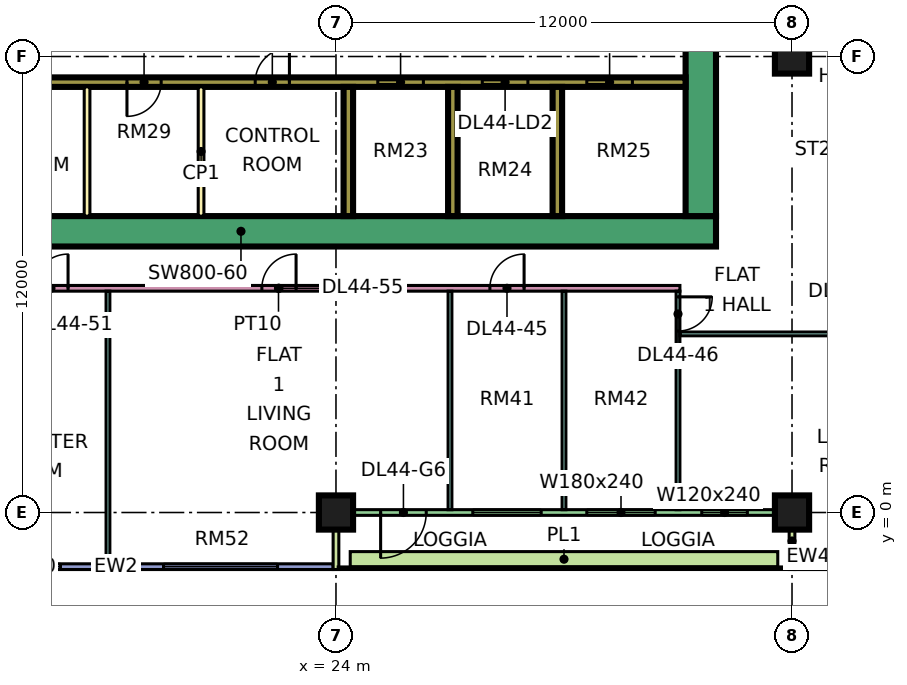
"""IFC4 building model, lengths in metres.
Left out: names, types, materials, properties, quantities, classifications, styles, units other than length and angle.
Written with IfcOpenShell. Run it as: python <this file> out.ifc"""

import sys

from ifc_helpers import new_model, si_unit, direction, frame, frame_2d, origin, origin_2d, place, context, subcontext, project, spatial, rectangle, extrude, element, fill, save


model = new_model("IFC4")
c1 = context("Model", 3, precision=1e-05, world=origin(), true_north=direction((0.0, 1.0)))
c2 = subcontext(c1, "Body", "Model", "MODEL_VIEW")
j1 = project(units=[si_unit("LENGTHUNIT", "METRE"), si_unit("PLANEANGLEUNIT", "RADIAN")], contexts=[c1])
p1 = place(None, origin())
s1 = spatial("IfcSite", under=j1, at=p1, CompositionType="ELEMENT")
p2 = place(p1, origin())
s2 = spatial("IfcBuilding", under=s1, at=p2, CompositionType="ELEMENT")
p3 = place(p2, frame((0.0, 0.0, 191.15)))
s3 = spatial("IfcBuildingStorey", under=s2, at=p3, CompositionType="ELEMENT", Elevation=191.15)
for number, where, z_axis, x_axis in (
    (1, (24.0, 0.0, 0.0), (0.0, 0.0, 1.0), (1.0, 0.0, 0.0)),
    (2, (36.0, 0.0, 0.0), (0.0, 0.0, 1.0), (1.0, 0.0, 0.0)),
    (3, (36.0, 12.0, 0.0), (0.0, 0.0, 1.0), (1.0, 0.0, 0.0)),
):
    element("IfcColumn", number, at=place(p3, frame(where, z_axis=z_axis, x_axis=x_axis)), inside=s3, PredefinedType="COLUMN", context=c2, shape_type="SweptSolid", body=[
        extrude(rectangle(XDim=0.9, YDim=0.9, at=origin_2d()), origin(), (0.0, 0.0, 1.0), 3.75),
    ])
p4 = place(p3, frame((9.0, 7.4, 0.0), z_axis=(0.0, 0.0, 1.0), x_axis=(1.0, 0.0, 0.0)))
e4 = element("IfcWall", 4, at=p4, inside=s3, PredefinedType="SHEAR", context=c2, shape_type="SweptSolid", body=[
    extrude(rectangle(XDim=25.0, YDim=0.8, at=frame_2d((12.5, 0.0))), origin(), (0.0, 0.0, 1.0), 3.75),
])
p5 = place(p3, frame((33.6, 7.8, 0.0), z_axis=(0.0, 0.0, 1.0), x_axis=(0.0, 1.0, 0.0)))
e5 = element("IfcWall", 5, at=p5, inside=s3, PredefinedType="SHEAR", context=c2, shape_type="SweptSolid", body=[
    extrude(rectangle(XDim=11.4, YDim=0.8, at=frame_2d((5.7, 0.0))), origin(), (0.0, 0.0, 1.0), 3.75),
])
p6 = place(p5, frame((5.4, 0.0, 0.0)))
e6 = element("IfcOpeningElement", 6, at=p6, cuts=e5, PredefinedType="OPENING", context=c2, shape_type="SweptSolid", body=[
    extrude(rectangle(XDim=1.8, YDim=2.4, at=frame_2d((0.9, 1.2))), frame((0.0, 0.41, 0.0), z_axis=(0.0, -1.0, 0.0), x_axis=(1.0, 0.0, 0.0)), (0.0, 0.0, 1.0), 0.82),
])
p7 = place(p3, frame((13.45, 11.325, 0.0), z_axis=(0.0, 0.0, 1.0), x_axis=(1.0, 0.0, 0.0)))
e7 = element("IfcWall", 7, at=p7, inside=s3, PredefinedType="SHEAR", context=c2, shape_type="SweptSolid", body=[
    extrude(rectangle(XDim=19.75, YDim=0.25, at=frame_2d((9.875, 0.0))), origin(), (0.0, 0.0, 1.0), 3.75),
])
p8 = place(p7, frame((11.65, 0.0, 0.0)))
e8 = element("IfcOpeningElement", 8, at=p8, cuts=e7, PredefinedType="OPENING", context=c2, shape_type="SweptSolid", body=[
    extrude(rectangle(XDim=1.2, YDim=2.2, at=frame_2d((0.6, 1.1))), frame((0.0, 0.135, 0.0), z_axis=(0.0, -1.0, 0.0), x_axis=(1.0, 0.0, 0.0)), (0.0, 0.0, 1.0), 0.27),
])
p9 = place(p7, frame((14.4, 0.0, 0.0)))
e9 = element("IfcOpeningElement", 9, at=p9, cuts=e7, PredefinedType="OPENING", context=c2, shape_type="SweptSolid", body=[
    extrude(rectangle(XDim=1.2, YDim=2.2, at=frame_2d((0.6, 1.1))), frame((0.0, 0.135, 0.0), z_axis=(0.0, -1.0, 0.0), x_axis=(1.0, 0.0, 0.0)), (0.0, 0.0, 1.0), 0.27),
])
p10 = place(p7, frame((17.15, 0.0, 0.0)))
e10 = element("IfcOpeningElement", 10, at=p10, cuts=e7, PredefinedType="OPENING", context=c2, shape_type="SweptSolid", body=[
    extrude(rectangle(XDim=1.2, YDim=2.2, at=frame_2d((0.6, 1.1))), frame((0.0, 0.135, 0.0), z_axis=(0.0, -1.0, 0.0), x_axis=(1.0, 0.0, 0.0)), (0.0, 0.0, 1.0), 0.27),
])
p11 = place(p7, frame((1.55, 0.0, 0.0)))
e11 = element("IfcOpeningElement", 11, at=p11, cuts=e7, PredefinedType="OPENING", context=c2, shape_type="SweptSolid", body=[
    extrude(rectangle(XDim=0.9, YDim=2.1, at=frame_2d((0.45, 1.05))), frame((0.0, 0.135, 0.0), z_axis=(0.0, -1.0, 0.0), x_axis=(1.0, 0.0, 0.0)), (0.0, 0.0, 1.0), 0.27),
])
p12 = place(p7, frame((5.05, 0.0, 0.0)))
e12 = element("IfcOpeningElement", 12, at=p12, cuts=e7, PredefinedType="OPENING", context=c2, shape_type="SweptSolid", body=[
    extrude(rectangle(XDim=0.9, YDim=2.1, at=frame_2d((0.45, 1.05))), frame((0.0, 0.135, 0.0), z_axis=(0.0, -1.0, 0.0), x_axis=(1.0, 0.0, 0.0)), (0.0, 0.0, 1.0), 0.27),
])
p13 = place(p7, frame((8.425, 0.0, 0.0)))
e13 = element("IfcOpeningElement", 13, at=p13, cuts=e7, PredefinedType="OPENING", context=c2, shape_type="SweptSolid", body=[
    extrude(rectangle(XDim=0.9, YDim=2.1, at=frame_2d((0.45, 1.05))), frame((0.0, 0.135, 0.0), z_axis=(0.0, -1.0, 0.0), x_axis=(1.0, 0.0, 0.0)), (0.0, 0.0, 1.0), 0.27),
])
for number, where, z_axis, x_axis in (
    (14, (24.325, 7.8, 0.0), (0.0, 0.0, 1.0), (0.0, 1.0, 0.0)),
    (15, (27.075, 7.8, 0.0), (0.0, 0.0, 1.0), (0.0, 1.0, 0.0)),
    (16, (29.825, 7.8, 0.0), (0.0, 0.0, 1.0), (0.0, 1.0, 0.0)),
):
    element("IfcWall", number, at=place(p3, frame(where, z_axis=z_axis, x_axis=x_axis)), inside=s3, PredefinedType="SHEAR", context=c2, shape_type="SweptSolid", body=[
        extrude(rectangle(XDim=3.4, YDim=0.25, at=frame_2d((1.7, 0.0))), origin(), (0.0, 0.0, 1.0), 3.75),
    ])
p14 = place(p3, frame((12.5, -1.425, 0.0), z_axis=(0.0, 0.0, 1.0), x_axis=(1.0, 0.0, 0.0)))
e17 = element("IfcWall", 17, at=p14, inside=s3, PredefinedType="SOLIDWALL", context=c2, shape_type="SweptSolid", body=[
    extrude(rectangle(XDim=11.425, YDim=0.15, at=frame_2d((5.712, 0.0))), origin(), (0.0, 0.0, 1.0), 3.35),
])
p15 = place(p14, frame((1.25, 0.0, 0.45)))
e18 = element("IfcOpeningElement", 18, at=p15, cuts=e17, PredefinedType="OPENING", context=c2, shape_type="SweptSolid", body=[
    extrude(rectangle(XDim=3.0, YDim=2.4, at=frame_2d((1.5, 1.2))), frame((0.0, 0.085, 0.0), z_axis=(0.0, -1.0, 0.0), x_axis=(1.0, 0.0, 0.0)), (0.0, 0.0, 1.0), 0.17),
])
p16 = place(p14, frame((6.962, 0.0, 0.45)))
e19 = element("IfcOpeningElement", 19, at=p16, cuts=e17, PredefinedType="OPENING", context=c2, shape_type="SweptSolid", body=[
    extrude(rectangle(XDim=3.0, YDim=2.4, at=frame_2d((1.5, 1.2))), frame((0.0, 0.085, 0.0), z_axis=(0.0, -1.0, 0.0), x_axis=(1.0, 0.0, 0.0)), (0.0, 0.0, 1.0), 0.17),
])
p17 = place(p3, frame((24.075, 0.0, 0.0), z_axis=(0.0, 0.0, 1.0), x_axis=(1.0, 0.0, 0.0)))
e20 = element("IfcWall", 20, at=p17, inside=s3, PredefinedType="SOLIDWALL", context=c2, shape_type="SweptSolid", body=[
    extrude(rectangle(XDim=11.85, YDim=0.15, at=frame_2d((5.925, 0.0))), origin(), (0.0, 0.0, 1.0), 3.35),
])
p18 = place(p17, frame((1.1, 0.0, 0.0)))
e21 = element("IfcOpeningElement", 21, at=p18, cuts=e20, PredefinedType="OPENING", context=c2, shape_type="SweptSolid", body=[
    extrude(rectangle(XDim=1.2, YDim=2.4, at=frame_2d((0.6, 1.2))), frame((0.0, 0.085, 0.0), z_axis=(0.0, -1.0, 0.0), x_axis=(1.0, 0.0, 0.0)), (0.0, 0.0, 1.0), 0.17),
])
p19 = place(p17, frame((3.525, 0.0, 0.45)))
e22 = element("IfcOpeningElement", 22, at=p19, cuts=e20, PredefinedType="OPENING", context=c2, shape_type="SweptSolid", body=[
    extrude(rectangle(XDim=1.8, YDim=2.4, at=frame_2d((0.9, 1.2))), frame((0.0, 0.085, 0.0), z_axis=(0.0, -1.0, 0.0), x_axis=(1.0, 0.0, 0.0)), (0.0, 0.0, 1.0), 0.17),
])
p20 = place(p17, frame((6.525, 0.0, 0.45)))
e23 = element("IfcOpeningElement", 23, at=p20, cuts=e20, PredefinedType="OPENING", context=c2, shape_type="SweptSolid", body=[
    extrude(rectangle(XDim=1.8, YDim=2.4, at=frame_2d((0.9, 1.2))), frame((0.0, 0.085, 0.0), z_axis=(0.0, -1.0, 0.0), x_axis=(1.0, 0.0, 0.0)), (0.0, 0.0, 1.0), 0.17),
])
p21 = place(p17, frame((9.55, 0.0, 0.45)))
e24 = element("IfcOpeningElement", 24, at=p21, cuts=e20, PredefinedType="OPENING", context=c2, shape_type="SweptSolid", body=[
    extrude(rectangle(XDim=1.2, YDim=2.4, at=frame_2d((0.6, 1.2))), frame((0.0, 0.085, 0.0), z_axis=(0.0, -1.0, 0.0), x_axis=(1.0, 0.0, 0.0)), (0.0, 0.0, 1.0), 0.17),
])
for number, where, z_axis, x_axis in (
    (25, (24.0, -1.5, 0.0), (0.0, 0.0, 1.0), (0.0, 1.0, 0.0)),
    (26, (36.0, -1.5, 0.0), (0.0, 0.0, 1.0), (0.0, 1.0, 0.0)),
):
    element("IfcWall", number, at=place(p3, frame(where, z_axis=z_axis, x_axis=x_axis)), inside=s3, PredefinedType="SOLIDWALL", context=c2, shape_type="SweptSolid", body=[
        extrude(rectangle(XDim=1.5, YDim=0.15, at=frame_2d((0.75, 0.0))), origin(), (0.0, 0.0, 1.0), 3.35),
    ])
p22 = place(p3, frame((36.075, -1.425, 0.0), z_axis=(0.0, 0.0, 1.0), x_axis=(1.0, 0.0, 0.0)))
e27 = element("IfcWall", 27, at=p22, inside=s3, PredefinedType="SOLIDWALL", context=c2, shape_type="SweptSolid", body=[
    extrude(rectangle(XDim=11.85, YDim=0.15, at=frame_2d((5.925, 0.0))), origin(), (0.0, 0.0, 1.0), 3.35),
])
p23 = place(p22, frame((1.462, 0.0, 0.45)))
e28 = element("IfcOpeningElement", 28, at=p23, cuts=e27, PredefinedType="OPENING", context=c2, shape_type="SweptSolid", body=[
    extrude(rectangle(XDim=3.0, YDim=2.4, at=frame_2d((1.5, 1.2))), frame((0.0, 0.085, 0.0), z_axis=(0.0, -1.0, 0.0), x_axis=(1.0, 0.0, 0.0)), (0.0, 0.0, 1.0), 0.17),
])
p24 = place(p22, frame((6.525, 0.0, 0.45)))
e29 = element("IfcOpeningElement", 29, at=p24, cuts=e27, PredefinedType="OPENING", context=c2, shape_type="SweptSolid", body=[
    extrude(rectangle(XDim=1.8, YDim=2.4, at=frame_2d((0.9, 1.2))), frame((0.0, 0.085, 0.0), z_axis=(0.0, -1.0, 0.0), x_axis=(1.0, 0.0, 0.0)), (0.0, 0.0, 1.0), 0.17),
])
p25 = place(p22, frame((9.488, 0.0, 0.45)))
e30 = element("IfcOpeningElement", 30, at=p25, cuts=e27, PredefinedType="OPENING", context=c2, shape_type="SweptSolid", body=[
    extrude(rectangle(XDim=1.8, YDim=2.4, at=frame_2d((0.9, 1.2))), frame((0.0, 0.085, 0.0), z_axis=(0.0, -1.0, 0.0), x_axis=(1.0, 0.0, 0.0)), (0.0, 0.0, 1.0), 0.17),
])
p26 = place(p3, frame((24.375, -1.229, 0.0), z_axis=(0.0, 0.0, 1.0), x_axis=(1.0, 0.0, 0.0)))
e31 = element("IfcWall", 31, at=p26, inside=s3, PredefinedType="SOLIDWALL", context=c2, shape_type="SweptSolid", body=[
    extrude(rectangle(XDim=11.25, YDim=0.4, at=frame_2d((5.625, 0.0))), origin(), (0.0, 0.0, 1.0), 0.7),
])
for number, where, z_axis, x_axis in (
    (32, (17.45, 7.8, 0.0), (0.0, 0.0, 1.0), (0.0, 1.0, 0.0)),
    (33, (20.45, 7.8, 0.0), (0.0, 0.0, 1.0), (0.0, 1.0, 0.0)),
):
    element("IfcWall", number, at=place(p3, frame(where, z_axis=z_axis, x_axis=x_axis)), inside=s3, PredefinedType="PARTITIONING", context=c2, shape_type="SweptSolid", body=[
        extrude(rectangle(XDim=3.4, YDim=0.15, at=frame_2d((1.7, 0.0))), origin(), (0.0, 0.0, 1.0), 3.35),
    ])
p27 = place(p3, frame((11.925, 5.9, 0.0), z_axis=(0.0, 0.0, 1.0), x_axis=(1.0, 0.0, 0.0)))
e34 = element("IfcWall", 34, at=p27, inside=s3, PredefinedType="PARTITIONING", context=c2, shape_type="SweptSolid", body=[
    extrude(rectangle(XDim=21.125, YDim=0.15, at=frame_2d((10.562, 0.0))), origin(), (0.0, 0.0, 1.0), 3.35),
])
p28 = place(p27, frame((16.125, 0.0, 0.0)))
e35 = element("IfcOpeningElement", 35, at=p28, cuts=e34, PredefinedType="OPENING", context=c2, shape_type="SweptSolid", body=[
    extrude(rectangle(XDim=0.9, YDim=2.1, at=frame_2d((0.45, 1.05))), frame((0.0, 0.085, 0.0), z_axis=(0.0, -1.0, 0.0), x_axis=(1.0, 0.0, 0.0)), (0.0, 0.0, 1.0), 0.17),
])
p29 = place(p27, frame((4.125, 0.0, 0.0)))
e36 = element("IfcOpeningElement", 36, at=p29, cuts=e34, PredefinedType="OPENING", context=c2, shape_type="SweptSolid", body=[
    extrude(rectangle(XDim=0.9, YDim=2.1, at=frame_2d((0.45, 1.05))), frame((0.0, 0.085, 0.0), z_axis=(0.0, -1.0, 0.0), x_axis=(1.0, 0.0, 0.0)), (0.0, 0.0, 1.0), 0.17),
])
p30 = place(p27, frame((10.125, 0.0, 0.0)))
e37 = element("IfcOpeningElement", 37, at=p30, cuts=e34, PredefinedType="OPENING", context=c2, shape_type="SweptSolid", body=[
    extrude(rectangle(XDim=0.9, YDim=2.1, at=frame_2d((0.45, 1.05))), frame((0.0, 0.085, 0.0), z_axis=(0.0, -1.0, 0.0), x_axis=(1.0, 0.0, 0.0)), (0.0, 0.0, 1.0), 0.17),
])
p31 = place(p3, frame((18.0, -1.35, 0.0), z_axis=(0.0, 0.0, 1.0), x_axis=(0.0, 1.0, 0.0)))
e38 = element("IfcWall", 38, at=p31, inside=s3, PredefinedType="PARTITIONING", context=c2, shape_type="SweptSolid", body=[
    extrude(rectangle(XDim=7.175, YDim=0.1, at=frame_2d((3.587, 0.0))), origin(), (0.0, 0.0, 1.0), 3.35),
])
for number, where, z_axis, x_axis in (
    (39, (27.0, 0.074, 0.0), (0.0, 0.0, 1.0), (0.0, 1.0, 0.0)),
    (40, (30.0, 0.074, 0.0), (0.0, 0.0, 1.0), (0.0, 1.0, 0.0)),
):
    element("IfcWall", number, at=place(p3, frame(where, z_axis=z_axis, x_axis=x_axis)), inside=s3, PredefinedType="PARTITIONING", context=c2, shape_type="SweptSolid", body=[
        extrude(rectangle(XDim=5.751, YDim=0.1, at=frame_2d((2.875, 0.0))), origin(), (0.0, 0.0, 1.0), 3.35),
    ])
p32 = place(p3, frame((33.0, 0.074, 0.0), z_axis=(0.0, 0.0, 1.0), x_axis=(0.0, 1.0, 0.0)))
e41 = element("IfcWall", 41, at=p32, inside=s3, PredefinedType="PARTITIONING", context=c2, shape_type="SweptSolid", body=[
    extrude(rectangle(XDim=5.751, YDim=0.1, at=frame_2d((2.875, 0.0))), origin(), (0.0, 0.0, 1.0), 3.35),
])
p33 = place(p32, frame((4.701, 0.0, 0.0)))
e42 = element("IfcOpeningElement", 42, at=p33, cuts=e41, PredefinedType="OPENING", context=c2, shape_type="SweptSolid", body=[
    extrude(rectangle(XDim=0.9, YDim=2.1, at=frame_2d((0.45, 1.05))), frame((0.0, 0.06, 0.0), z_axis=(0.0, -1.0, 0.0), x_axis=(1.0, 0.0, 0.0)), (0.0, 0.0, 1.0), 0.12),
])
p34 = place(p3, frame((33.05, 4.7, 0.0), z_axis=(0.0, 0.0, 1.0), x_axis=(1.0, 0.0, 0.0)))
e43 = element("IfcWall", 43, at=p34, inside=s3, PredefinedType="PARTITIONING", context=c2, shape_type="SweptSolid", body=[
    extrude(rectangle(XDim=14.85, YDim=0.1, at=frame_2d((7.425, 0.0))), origin(), (0.0, 0.0, 1.0), 3.35),
])
p35 = place(p34, frame((10.0, 0.0, 0.0)))
e44 = element("IfcOpeningElement", 44, at=p35, cuts=e43, PredefinedType="OPENING", context=c2, shape_type="SweptSolid", body=[
    extrude(rectangle(XDim=0.9, YDim=2.1, at=frame_2d((0.45, 1.05))), frame((0.0, 0.06, 0.0), z_axis=(0.0, -1.0, 0.0), x_axis=(1.0, 0.0, 0.0)), (0.0, 0.0, 1.0), 0.12),
])
p36 = place(p34, frame((13.0, 0.0, 0.0)))
e45 = element("IfcOpeningElement", 45, at=p36, cuts=e43, PredefinedType="OPENING", context=c2, shape_type="SweptSolid", body=[
    extrude(rectangle(XDim=0.9, YDim=2.1, at=frame_2d((0.45, 1.05))), frame((0.0, 0.06, 0.0), z_axis=(0.0, -1.0, 0.0), x_axis=(1.0, 0.0, 0.0)), (0.0, 0.0, 1.0), 0.12),
])
p37 = place(p34, frame((4.0, 0.0, 0.0)))
e46 = element("IfcOpeningElement", 46, at=p37, cuts=e43, PredefinedType="OPENING", context=c2, shape_type="SweptSolid", body=[
    extrude(rectangle(XDim=0.9, YDim=2.1, at=frame_2d((0.45, 1.05))), frame((0.0, 0.06, 0.0), z_axis=(0.0, -1.0, 0.0), x_axis=(1.0, 0.0, 0.0)), (0.0, 0.0, 1.0), 0.12),
])
p38 = place(p15, origin())
e47 = element("IfcWindow", 47, at=p38, inside=s3, PartitioningType="SINGLE_PANEL", PredefinedType="WINDOW", context=c2, shape_type="SweptSolid", body=[
    extrude(rectangle(XDim=3.0, YDim=2.4, at=frame_2d((1.5, 1.2))), frame((0.0, 0.03, 0.0), z_axis=(0.0, -1.0, 0.0), x_axis=(1.0, 0.0, 0.0)), (0.0, 0.0, 1.0), 0.06),
])
fill(e18, e47)
p39 = place(p16, origin())
e48 = element("IfcWindow", 48, at=p39, inside=s3, PartitioningType="SINGLE_PANEL", PredefinedType="WINDOW", context=c2, shape_type="SweptSolid", body=[
    extrude(rectangle(XDim=3.0, YDim=2.4, at=frame_2d((1.5, 1.2))), frame((0.0, 0.03, 0.0), z_axis=(0.0, -1.0, 0.0), x_axis=(1.0, 0.0, 0.0)), (0.0, 0.0, 1.0), 0.06),
])
fill(e19, e48)
p40 = place(p18, frame((1.2, 0.0, 0.0), z_axis=(0.0, 0.0, 1.0), x_axis=(-1.0, 0.0, 0.0)))
e49 = element("IfcDoor", 49, at=p40, inside=s3, OperationType="DOUBLE_DOOR_SINGLE_SWING", PredefinedType="DOOR", context=c2, shape_type="SweptSolid", body=[
    extrude(rectangle(XDim=1.2, YDim=2.4, at=frame_2d((0.6, 1.2))), frame((0.0, 0.025, 0.0), z_axis=(0.0, -1.0, 0.0), x_axis=(1.0, 0.0, 0.0)), (0.0, 0.0, 1.0), 0.05),
])
fill(e21, e49)
p41 = place(p19, origin())
e50 = element("IfcWindow", 50, at=p41, inside=s3, PartitioningType="SINGLE_PANEL", PredefinedType="WINDOW", context=c2, shape_type="SweptSolid", body=[
    extrude(rectangle(XDim=1.8, YDim=2.4, at=frame_2d((0.9, 1.2))), frame((0.0, 0.03, 0.0), z_axis=(0.0, -1.0, 0.0), x_axis=(1.0, 0.0, 0.0)), (0.0, 0.0, 1.0), 0.06),
])
fill(e22, e50)
p42 = place(p20, origin())
e51 = element("IfcWindow", 51, at=p42, inside=s3, PartitioningType="SINGLE_PANEL", PredefinedType="WINDOW", context=c2, shape_type="SweptSolid", body=[
    extrude(rectangle(XDim=1.8, YDim=2.4, at=frame_2d((0.9, 1.2))), frame((0.0, 0.03, 0.0), z_axis=(0.0, -1.0, 0.0), x_axis=(1.0, 0.0, 0.0)), (0.0, 0.0, 1.0), 0.06),
])
fill(e23, e51)
p43 = place(p21, origin())
e52 = element("IfcWindow", 52, at=p43, inside=s3, PartitioningType="SINGLE_PANEL", PredefinedType="WINDOW", context=c2, shape_type="SweptSolid", body=[
    extrude(rectangle(XDim=1.2, YDim=2.4, at=frame_2d((0.6, 1.2))), frame((0.0, 0.03, 0.0), z_axis=(0.0, -1.0, 0.0), x_axis=(1.0, 0.0, 0.0)), (0.0, 0.0, 1.0), 0.06),
])
fill(e24, e52)
p44 = place(p8, origin())
e53 = element("IfcDoor", 53, at=p44, inside=s3, OperationType="DOUBLE_DOOR_SLIDING", PredefinedType="DOOR", context=c2, shape_type="SweptSolid", body=[
    extrude(rectangle(XDim=1.2, YDim=2.2, at=frame_2d((0.6, 1.1))), frame((0.0, 0.025, 0.0), z_axis=(0.0, -1.0, 0.0), x_axis=(1.0, 0.0, 0.0)), (0.0, 0.0, 1.0), 0.05),
])
fill(e8, e53)
p45 = place(p9, origin())
e54 = element("IfcDoor", 54, at=p45, inside=s3, OperationType="DOUBLE_DOOR_SLIDING", PredefinedType="DOOR", context=c2, shape_type="SweptSolid", body=[
    extrude(rectangle(XDim=1.2, YDim=2.2, at=frame_2d((0.6, 1.1))), frame((0.0, 0.025, 0.0), z_axis=(0.0, -1.0, 0.0), x_axis=(1.0, 0.0, 0.0)), (0.0, 0.0, 1.0), 0.05),
])
fill(e9, e54)
p46 = place(p10, origin())
e55 = element("IfcDoor", 55, at=p46, inside=s3, OperationType="DOUBLE_DOOR_SLIDING", PredefinedType="DOOR", context=c2, shape_type="SweptSolid", body=[
    extrude(rectangle(XDim=1.2, YDim=2.2, at=frame_2d((0.6, 1.1))), frame((0.0, 0.025, 0.0), z_axis=(0.0, -1.0, 0.0), x_axis=(1.0, 0.0, 0.0)), (0.0, 0.0, 1.0), 0.05),
])
fill(e10, e55)
p47 = place(p12, frame((0.9, 0.0, 0.0), z_axis=(0.0, 0.0, 1.0), x_axis=(-1.0, 0.0, 0.0)))
e56 = element("IfcDoor", 56, at=p47, inside=s3, OperationType="SINGLE_SWING_LEFT", PredefinedType="DOOR", context=c2, shape_type="SweptSolid", body=[
    extrude(rectangle(XDim=0.9, YDim=2.1, at=frame_2d((0.45, 1.05))), frame((0.0, 0.025, 0.0), z_axis=(0.0, -1.0, 0.0), x_axis=(1.0, 0.0, 0.0)), (0.0, 0.0, 1.0), 0.05),
])
fill(e12, e56)
p48 = place(p13, frame((0.9, 0.0, 0.0), z_axis=(0.0, 0.0, 1.0), x_axis=(-1.0, 0.0, 0.0)))
e57 = element("IfcDoor", 57, at=p48, inside=s3, OperationType="SINGLE_SWING_RIGHT", PredefinedType="DOOR", context=c2, shape_type="SweptSolid", body=[
    extrude(rectangle(XDim=0.9, YDim=2.1, at=frame_2d((0.45, 1.05))), frame((0.0, 0.025, 0.0), z_axis=(0.0, -1.0, 0.0), x_axis=(1.0, 0.0, 0.0)), (0.0, 0.0, 1.0), 0.05),
])
fill(e13, e57)
p49 = place(p28, frame((0.9, 0.0, 0.0), z_axis=(0.0, 0.0, 1.0), x_axis=(-1.0, 0.0, 0.0)))
e58 = element("IfcDoor", 58, at=p49, inside=s3, OperationType="SINGLE_SWING_RIGHT", PredefinedType="DOOR", context=c2, shape_type="SweptSolid", body=[
    extrude(rectangle(XDim=0.9, YDim=2.1, at=frame_2d((0.45, 1.05))), frame((0.0, 0.025, 0.0), z_axis=(0.0, -1.0, 0.0), x_axis=(1.0, 0.0, 0.0)), (0.0, 0.0, 1.0), 0.05),
])
fill(e35, e58)
p50 = place(p33, origin())
e59 = element("IfcDoor", 59, at=p50, inside=s3, OperationType="SINGLE_SWING_RIGHT", PredefinedType="DOOR", context=c2, shape_type="SweptSolid", body=[
    extrude(rectangle(XDim=0.9, YDim=2.1, at=frame_2d((0.45, 1.05))), frame((0.0, 0.025, 0.0), z_axis=(0.0, -1.0, 0.0), x_axis=(1.0, 0.0, 0.0)), (0.0, 0.0, 1.0), 0.05),
])
fill(e42, e59)
p51 = place(p29, frame((0.9, 0.0, 0.0), z_axis=(0.0, 0.0, 1.0), x_axis=(-1.0, 0.0, 0.0)))
e60 = element("IfcDoor", 60, at=p51, inside=s3, OperationType="SINGLE_SWING_RIGHT", PredefinedType="DOOR", context=c2, shape_type="SweptSolid", body=[
    extrude(rectangle(XDim=0.9, YDim=2.1, at=frame_2d((0.45, 1.05))), frame((0.0, 0.025, 0.0), z_axis=(0.0, -1.0, 0.0), x_axis=(1.0, 0.0, 0.0)), (0.0, 0.0, 1.0), 0.05),
])
fill(e36, e60)
p52 = place(p30, frame((0.9, 0.0, 0.0), z_axis=(0.0, 0.0, 1.0), x_axis=(-1.0, 0.0, 0.0)))
e61 = element("IfcDoor", 61, at=p52, inside=s3, OperationType="SINGLE_SWING_RIGHT", PredefinedType="DOOR", context=c2, shape_type="SweptSolid", body=[
    extrude(rectangle(XDim=0.9, YDim=2.1, at=frame_2d((0.45, 1.05))), frame((0.0, 0.025, 0.0), z_axis=(0.0, -1.0, 0.0), x_axis=(1.0, 0.0, 0.0)), (0.0, 0.0, 1.0), 0.05),
])
fill(e37, e61)
save(model, sys.argv[1])
